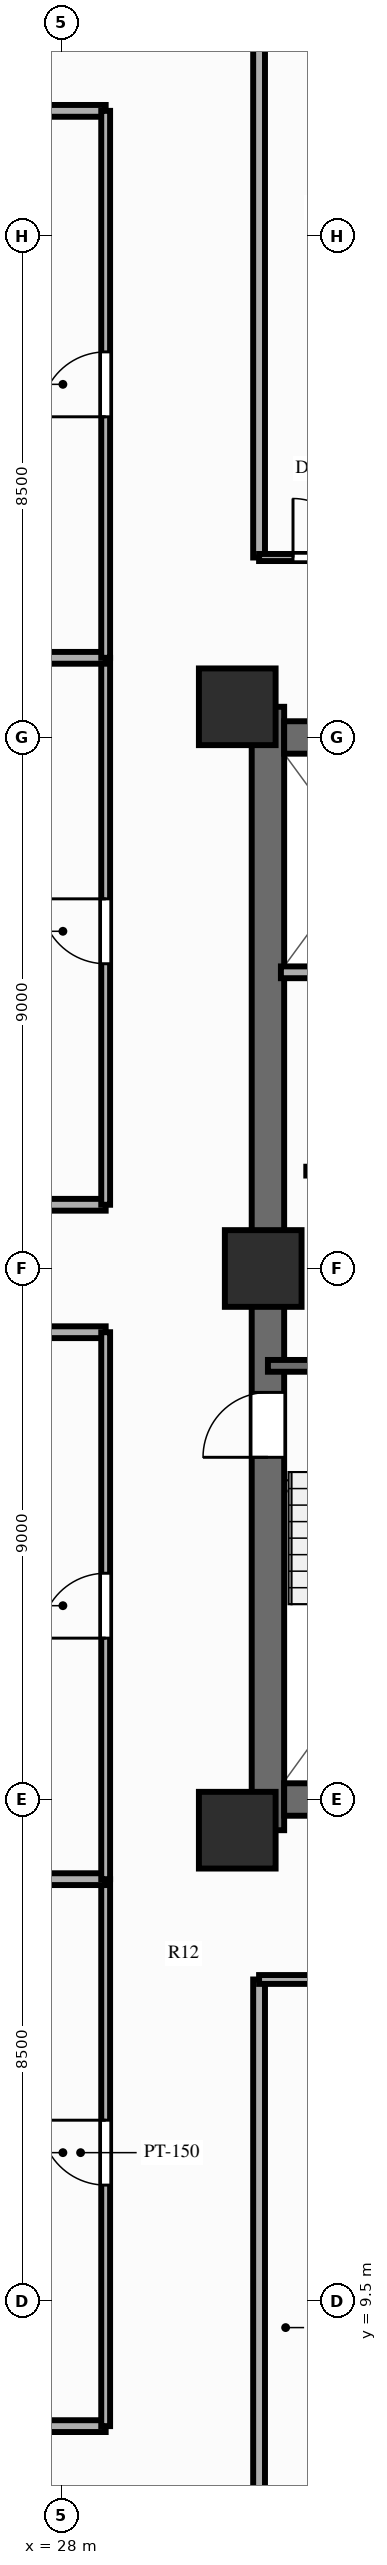
"""IFC4 building model, lengths in metres.
Left out: names, types, materials, properties, quantities, classifications, styles, units other than length and angle.
Written with IfcOpenShell. Run it as: python <this file> out.ifc"""

import sys

from ifc_helpers import new_model, si_unit, direction, frame, frame_2d, origin, origin_2d, place, context, subcontext, project, spatial, rectangle, extrude, source, transform, mapped, element, fill, save


model = new_model("IFC4")
c1 = context("Model", 3, precision=1e-05, world=origin(), true_north=direction((0.0, 1.0)))
c2 = subcontext(c1, "Body", "Model", "MODEL_VIEW")
j1 = project(units=[si_unit("LENGTHUNIT", "METRE"), si_unit("PLANEANGLEUNIT", "RADIAN")], contexts=[c1])
p1 = place(None, origin())
s1 = spatial("IfcSite", under=j1, at=p1, CompositionType="ELEMENT")
p2 = place(p1, origin())
s2 = spatial("IfcBuilding", under=s1, at=p2, CompositionType="ELEMENT")
p3 = place(p2, frame((0.0, 0.0, 101.85)))
s3 = spatial("IfcBuildingStorey", under=s2, at=p3, CompositionType="ELEMENT", Elevation=101.85)
p4 = place(p3, frame((31.5, 17.48, 0.0), z_axis=(0.0, 0.0, 1.0), x_axis=(0.0, 1.0, 0.0)))
e1 = element("IfcWall", 1, at=p4, inside=s3, PredefinedType="SHEAR", context=c2, shape_type="SweptSolid", body=[
    extrude(rectangle(XDim=19.04, YDim=0.55, at=frame_2d((9.52, 0.0))), origin(), (0.0, 0.0, 1.0), 3.0),
])
p5 = place(p4, frame((6.32, 0.0, 0.0)))
e2 = element("IfcOpeningElement", 2, at=p5, cuts=e1, PredefinedType="OPENING", context=c2, shape_type="SweptSolid", body=[
    extrude(rectangle(XDim=1.1, YDim=2.15, at=frame_2d((0.55, 1.075))), frame((0.0, 0.287, 0.0), z_axis=(0.0, -1.0, 0.0), x_axis=(1.0, 0.0, 0.0)), (0.0, 0.0, 1.0), 0.574),
])
p6 = place(p3, frame((31.775, 18.0, 0.0), z_axis=(0.0, 0.0, 1.0), x_axis=(1.0, 0.0, 0.0)))
e3 = element("IfcWall", 3, at=p6, inside=s3, PredefinedType="SHEAR", context=c2, shape_type="SweptSolid", body=[
    extrude(rectangle(XDim=12.45, YDim=0.55, at=frame_2d((6.225, 0.0))), origin(), (0.0, 0.0, 1.0), 3.0),
])
p7 = place(p3, frame((31.775, 36.0, 0.0), z_axis=(0.0, 0.0, 1.0), x_axis=(1.0, 0.0, 0.0)))
e4 = element("IfcWall", 4, at=p7, inside=s3, PredefinedType="SHEAR", context=c2, shape_type="SweptSolid", body=[
    extrude(rectangle(XDim=12.45, YDim=0.55, at=frame_2d((6.225, 0.0))), origin(), (0.0, 0.0, 1.0), 3.0),
])
p8 = place(p7, frame((5.175, 0.0, 0.0), z_axis=(0.0, 0.0, 1.0), x_axis=(-1.0, 0.0, 0.0)))
e5 = element("IfcOpeningElement", 5, at=p8, cuts=e4, PredefinedType="OPENING", context=c2, shape_type="SweptSolid", body=[
    extrude(rectangle(XDim=1.4, YDim=2.15, at=frame_2d((0.7, 1.075))), frame((0.0, 0.287, 0.0), z_axis=(0.0, -1.0, 0.0), x_axis=(1.0, 0.0, 0.0)), (0.0, 0.0, 1.0), 0.574),
])
m1 = source(origin(), c2, "Body", "SweptSolid", [
    extrude(rectangle(XDim=1.3, YDim=1.3, at=origin_2d()), origin(), (0.0, 0.0, 1.0), 3.0),
])
for number, where, z_axis, x_axis in (
    (6, (30.98, 17.48, 0.0), (0.0, 0.0, 1.0), (1.0, 0.0, 0.0)),
    (7, (30.98, 36.52, 0.0), (0.0, 0.0, 1.0), (1.0, 0.0, 0.0)),
    (8, (31.42, 27.0, 0.0), (0.0, 0.0, 1.0), (1.0, 0.0, 0.0)),
):
    element("IfcColumn", number, at=place(p3, frame(where, z_axis=z_axis, x_axis=x_axis)), inside=s3, PredefinedType="COLUMN", context=c2, shape_type="MappedRepresentation", body=[
        mapped(m1, transform((0.0, 0.0, 0.0), scale=1.0)),
    ])
p9 = place(p3, frame((32.15, 28.65, 0.0), z_axis=(0.0, 0.0, 1.0), x_axis=(1.0, 0.0, 0.0)))
e9 = element("IfcWall", 9, at=p9, inside=s3, PredefinedType="PARTITIONING", context=c2, shape_type="SweptSolid", body=[
    extrude(rectangle(XDim=2.27, YDim=0.15, at=frame_2d((1.135, 0.0))), origin(), (0.0, 0.0, 1.0), 2.14),
])
p10 = place(p3, frame((31.5, 25.35, 0.0), z_axis=(0.0, 0.0, 1.0), x_axis=(1.0, 0.0, 0.0)))
e10 = element("IfcWall", 10, at=p10, inside=s3, PredefinedType="SOLIDWALL", context=c2, shape_type="SweptSolid", body=[
    extrude(rectangle(XDim=3.93, YDim=0.2, at=frame_2d((1.965, 0.0))), origin(), (0.0, 0.0, 1.0), 2.79),
])
p11 = place(p3, frame((31.72, 32.02, 0.0), z_axis=(0.0, 0.0, 1.0), x_axis=(1.0, 0.0, 0.0)))
e11 = element("IfcWall", 11, at=p11, inside=s3, PredefinedType="PARTITIONING", context=c2, shape_type="SweptSolid", body=[
    extrude(rectangle(XDim=2.8, YDim=0.2, at=frame_2d((1.4, 0.0))), origin(), (0.0, 0.0, 1.0), 2.79),
])
p12 = place(p3, frame((31.35, 14.95, 0.0), z_axis=(0.0, 0.0, 1.0), x_axis=(0.0, -1.0, 0.0)))
e12 = element("IfcWall", 12, at=p12, inside=s3, PredefinedType="PARTITIONING", context=c2, shape_type="SweptSolid", body=[
    extrude(rectangle(XDim=11.8, YDim=0.2, at=frame_2d((5.9, 0.0))), origin(), (0.0, 0.0, 1.0), 2.34),
])
p13 = place(p3, frame((31.35, 14.95, 0.0), z_axis=(0.0, 0.0, 1.0), x_axis=(1.0, 0.0, 0.0)))
e13 = element("IfcWall", 13, at=p13, inside=s3, PredefinedType="PARTITIONING", context=c2, shape_type="SweptSolid", body=[
    extrude(rectangle(XDim=6.384, YDim=0.15, at=frame_2d((3.192, 0.0))), origin(), (0.0, 0.0, 1.0), 2.79),
])
p14 = place(p13, frame((2.642, 0.0, 0.0)))
e14 = element("IfcOpeningElement", 14, at=p14, cuts=e13, PredefinedType="OPENING", context=c2, shape_type="SweptSolid", body=[
    extrude(rectangle(XDim=1.1, YDim=2.15, at=frame_2d((0.55, 1.075))), frame((0.0, 0.087, 0.0), z_axis=(0.0, -1.0, 0.0), x_axis=(1.0, 0.0, 0.0)), (0.0, 0.0, 1.0), 0.174),
])
p15 = place(p3, frame((31.35, 39.05, 0.0), z_axis=(0.0, 0.0, 1.0), x_axis=(0.0, 1.0, 0.0)))
e15 = element("IfcWall", 15, at=p15, inside=s3, PredefinedType="PARTITIONING", context=c2, shape_type="SweptSolid", body=[
    extrude(rectangle(XDim=11.8, YDim=0.2, at=frame_2d((5.9, 0.0))), origin(), (0.0, 0.0, 1.0), 2.34),
])
p16 = place(p3, frame((31.35, 39.05, 0.0), z_axis=(0.0, 0.0, 1.0), x_axis=(1.0, 0.0, 0.0)))
e16 = element("IfcWall", 16, at=p16, inside=s3, PredefinedType="PARTITIONING", context=c2, shape_type="SweptSolid", body=[
    extrude(rectangle(XDim=2.15, YDim=0.12, at=frame_2d((1.075, 0.0))), origin(), (0.0, 0.0, 1.0), 2.79),
])
p17 = place(p16, frame((0.575, 0.0, 0.0)))
e17 = element("IfcOpeningElement", 17, at=p17, cuts=e16, PredefinedType="OPENING", context=c2, shape_type="SweptSolid", body=[
    extrude(rectangle(XDim=1.0, YDim=2.1, at=frame_2d((0.5, 1.05))), frame((0.0, 0.072, 0.0), z_axis=(0.0, -1.0, 0.0), x_axis=(1.0, 0.0, 0.0)), (0.0, 0.0, 1.0), 0.144),
])
for number, where, z_axis, x_axis in (
    (18, (28.75, 7.38, 0.0), (0.0, 0.0, 1.0), (-1.0, 0.0, 0.0)),
    (19, (28.75, 25.92, 0.0), (0.0, 0.0, 1.0), (-1.0, 0.0, 0.0)),
):
    element("IfcWall", number, at=place(p3, frame(where, z_axis=z_axis, x_axis=x_axis)), inside=s3, PredefinedType="PARTITIONING", context=c2, shape_type="SweptSolid", body=[
        extrude(rectangle(XDim=16.6, YDim=0.2, at=frame_2d((8.3, 0.0))), origin(), (0.0, 0.0, 1.0), 2.79),
    ])
p18 = place(p3, frame((28.75, 7.38, 0.0), z_axis=(0.0, 0.0, 1.0), x_axis=(0.0, 1.0, 0.0)))
e20 = element("IfcWall", 20, at=p18, inside=s3, PredefinedType="PARTITIONING", context=c2, shape_type="SweptSolid", body=[
    extrude(rectangle(XDim=9.27, YDim=0.15, at=frame_2d((4.635, 0.0))), origin(), (0.0, 0.0, 1.0), 2.79),
])
p19 = place(p18, frame((4.085, 0.0, 0.0)))
e21 = element("IfcOpeningElement", 21, at=p19, cuts=e20, PredefinedType="OPENING", context=c2, shape_type="SweptSolid", body=[
    extrude(rectangle(XDim=1.1, YDim=2.15, at=frame_2d((0.55, 1.075))), frame((0.0, 0.087, 0.0), z_axis=(0.0, -1.0, 0.0), x_axis=(1.0, 0.0, 0.0)), (0.0, 0.0, 1.0), 0.174),
])
p20 = place(p3, frame((28.75, 16.65, 0.0), z_axis=(0.0, 0.0, 1.0), x_axis=(-1.0, 0.0, 0.0)))
e22 = element("IfcWall", 22, at=p20, inside=s3, PredefinedType="PARTITIONING", context=c2, shape_type="SweptSolid", body=[
    extrude(rectangle(XDim=16.6, YDim=0.2, at=frame_2d((8.3, 0.0))), origin(), (0.0, 0.0, 1.0), 2.79),
])
p21 = place(p3, frame((28.75, 16.65, 0.0), z_axis=(0.0, 0.0, 1.0), x_axis=(0.0, 1.0, 0.0)))
e23 = element("IfcWall", 23, at=p21, inside=s3, PredefinedType="PARTITIONING", context=c2, shape_type="SweptSolid", body=[
    extrude(rectangle(XDim=9.27, YDim=0.15, at=frame_2d((4.635, 0.0))), origin(), (0.0, 0.0, 1.0), 2.79),
])
p22 = place(p21, frame((4.085, 0.0, 0.0)))
e24 = element("IfcOpeningElement", 24, at=p22, cuts=e23, PredefinedType="OPENING", context=c2, shape_type="SweptSolid", body=[
    extrude(rectangle(XDim=1.1, YDim=2.15, at=frame_2d((0.55, 1.075))), frame((0.0, 0.087, 0.0), z_axis=(0.0, -1.0, 0.0), x_axis=(1.0, 0.0, 0.0)), (0.0, 0.0, 1.0), 0.174),
])
for number, where, z_axis, x_axis in (
    (25, (28.75, 28.08, 0.0), (0.0, 0.0, 1.0), (-1.0, 0.0, 0.0)),
    (26, (28.75, 46.62, 0.0), (0.0, 0.0, 1.0), (-1.0, 0.0, 0.0)),
):
    element("IfcWall", number, at=place(p3, frame(where, z_axis=z_axis, x_axis=x_axis)), inside=s3, PredefinedType="PARTITIONING", context=c2, shape_type="SweptSolid", body=[
        extrude(rectangle(XDim=16.6, YDim=0.2, at=frame_2d((8.3, 0.0))), origin(), (0.0, 0.0, 1.0), 2.79),
    ])
p23 = place(p3, frame((28.75, 28.08, 0.0), z_axis=(0.0, 0.0, 1.0), x_axis=(0.0, 1.0, 0.0)))
e27 = element("IfcWall", 27, at=p23, inside=s3, PredefinedType="PARTITIONING", context=c2, shape_type="SweptSolid", body=[
    extrude(rectangle(XDim=9.27, YDim=0.15, at=frame_2d((4.635, 0.0))), origin(), (0.0, 0.0, 1.0), 2.79),
])
p24 = place(p23, frame((4.085, 0.0, 0.0)))
e28 = element("IfcOpeningElement", 28, at=p24, cuts=e27, PredefinedType="OPENING", context=c2, shape_type="SweptSolid", body=[
    extrude(rectangle(XDim=1.1, YDim=2.15, at=frame_2d((0.55, 1.075))), frame((0.0, 0.087, 0.0), z_axis=(0.0, -1.0, 0.0), x_axis=(1.0, 0.0, 0.0)), (0.0, 0.0, 1.0), 0.174),
])
p25 = place(p3, frame((28.75, 37.35, 0.0), z_axis=(0.0, 0.0, 1.0), x_axis=(-1.0, 0.0, 0.0)))
e29 = element("IfcWall", 29, at=p25, inside=s3, PredefinedType="PARTITIONING", context=c2, shape_type="SweptSolid", body=[
    extrude(rectangle(XDim=16.6, YDim=0.2, at=frame_2d((8.3, 0.0))), origin(), (0.0, 0.0, 1.0), 2.79),
])
p26 = place(p3, frame((28.75, 37.35, 0.0), z_axis=(0.0, 0.0, 1.0), x_axis=(0.0, 1.0, 0.0)))
e30 = element("IfcWall", 30, at=p26, inside=s3, PredefinedType="PARTITIONING", context=c2, shape_type="SweptSolid", body=[
    extrude(rectangle(XDim=9.27, YDim=0.15, at=frame_2d((4.635, 0.0))), origin(), (0.0, 0.0, 1.0), 2.79),
])
p27 = place(p26, frame((4.085, 0.0, 0.0)))
e31 = element("IfcOpeningElement", 31, at=p27, cuts=e30, PredefinedType="OPENING", context=c2, shape_type="SweptSolid", body=[
    extrude(rectangle(XDim=1.1, YDim=2.15, at=frame_2d((0.55, 1.075))), frame((0.0, 0.087, 0.0), z_axis=(0.0, -1.0, 0.0), x_axis=(1.0, 0.0, 0.0)), (0.0, 0.0, 1.0), 0.174),
])
m2 = source(origin(), c2, "Body", "SweptSolid", [
    extrude(rectangle(XDim=1.1, YDim=2.15, at=frame_2d((0.55, 1.075))), frame((0.0, 0.025, 0.0), z_axis=(0.0, -1.0, 0.0), x_axis=(1.0, 0.0, 0.0)), (0.0, 0.0, 1.0), 0.05),
])
p28 = place(p5, origin())
e32 = element("IfcDoor", 32, at=p28, inside=s3, OperationType="SINGLE_SWING_LEFT", PredefinedType="DOOR", context=c2, shape_type="MappedRepresentation", body=[
    mapped(m2, transform((0.0, 0.0, 0.0), scale=1.0)),
])
fill(e2, e32)
m3 = source(origin(), c2, "Body", "SweptSolid", [
    extrude(rectangle(XDim=1.0, YDim=2.1, at=frame_2d((0.5, 1.05))), frame((0.0, 0.025, 0.0), z_axis=(0.0, -1.0, 0.0), x_axis=(1.0, 0.0, 0.0)), (0.0, 0.0, 1.0), 0.05),
])
p29 = place(p17, origin())
e33 = element("IfcDoor", 33, at=p29, inside=s3, OperationType="SINGLE_SWING_LEFT", PredefinedType="DOOR", context=c2, shape_type="MappedRepresentation", body=[
    mapped(m3, transform((0.0, 0.0, 0.0), scale=1.0)),
])
fill(e17, e33)
p30 = place(p19, origin())
e34 = element("IfcDoor", 34, at=p30, inside=s3, OperationType="SINGLE_SWING_RIGHT", PredefinedType="DOOR", context=c2, shape_type="MappedRepresentation", body=[
    mapped(m2, transform((0.0, 0.0, 0.0), scale=1.0)),
])
fill(e21, e34)
p31 = place(p22, origin())
e35 = element("IfcDoor", 35, at=p31, inside=s3, OperationType="SINGLE_SWING_LEFT", PredefinedType="DOOR", context=c2, shape_type="MappedRepresentation", body=[
    mapped(m2, transform((0.0, 0.0, 0.0), scale=1.0)),
])
fill(e24, e35)
p32 = place(p24, origin())
e36 = element("IfcDoor", 36, at=p32, inside=s3, OperationType="SINGLE_SWING_RIGHT", PredefinedType="DOOR", context=c2, shape_type="MappedRepresentation", body=[
    mapped(m2, transform((0.0, 0.0, 0.0), scale=1.0)),
])
fill(e28, e36)
p33 = place(p27, origin())
e37 = element("IfcDoor", 37, at=p33, inside=s3, OperationType="SINGLE_SWING_LEFT", PredefinedType="DOOR", context=c2, shape_type="MappedRepresentation", body=[
    mapped(m2, transform((0.0, 0.0, 0.0), scale=1.0)),
])
fill(e31, e37)
save(model, sys.argv[1])
